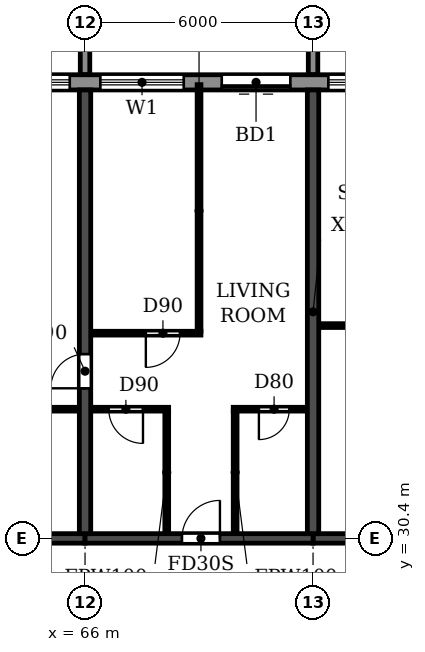
"""IFC4 building model, lengths in metres.
Left out: names, types, materials, properties, quantities, classifications, styles, units other than length and angle.
Written with IfcOpenShell. Run it as: python <this file> out.ifc"""

import sys

from ifc_helpers import new_model, si_unit, direction, frame, frame_2d, origin, place, context, subcontext, project, spatial, polyline, rectangle, outline, extrude, source, transform, mapped, element, fill, save


model = new_model("IFC4")
c1 = context("Model", 3, precision=1e-05, world=origin(), true_north=direction((0.0, 1.0)))
c2 = subcontext(c1, "Body", "Model", "MODEL_VIEW")
j1 = project(units=[si_unit("LENGTHUNIT", "METRE"), si_unit("PLANEANGLEUNIT", "RADIAN")], contexts=[c1])
p1 = place(None, origin())
s1 = spatial("IfcSite", under=j1, at=p1, CompositionType="ELEMENT")
p2 = place(p1, origin())
s2 = spatial("IfcBuilding", under=s1, at=p2, CompositionType="ELEMENT")
p3 = place(p2, frame((0.0, 0.0, 162.0)))
s3 = spatial("IfcBuildingStorey", under=s2, at=p3, CompositionType="ELEMENT", Elevation=162.0)
p4 = place(p3, frame((66.0, 30.525, 0.0), z_axis=(0.0, 0.0, 1.0), x_axis=(0.0, 1.0, 0.0)))
e1 = element("IfcWall", 1, at=p4, inside=s3, PredefinedType="SHEAR", context=c2, shape_type="SweptSolid", body=[
    extrude(rectangle(XDim=11.675, YDim=0.3, at=frame_2d((5.837, 0.0))), origin(), (0.0, 0.0, 1.0), 2.95),
])
p5 = place(p4, frame((3.825, 0.0, 0.0)))
e2 = element("IfcOpeningElement", 2, at=p5, cuts=e1, PredefinedType="OPENING", context=c2, shape_type="SweptSolid", body=[
    extrude(rectangle(XDim=0.9, YDim=2.1, at=frame_2d((0.45, 1.05))), frame((0.0, 0.16, 0.0), z_axis=(0.0, -1.0, 0.0), x_axis=(1.0, 0.0, 0.0)), (0.0, 0.0, 1.0), 0.32),
])
p6 = place(p3, frame((72.0, 30.525, 0.0), z_axis=(0.0, 0.0, 1.0), x_axis=(0.0, 1.0, 0.0)))
e3 = element("IfcWall", 3, at=p6, inside=s3, PredefinedType="SHEAR", context=c2, shape_type="SweptSolid", body=[
    extrude(rectangle(XDim=11.675, YDim=0.3, at=frame_2d((5.837, 0.0))), origin(), (0.0, 0.0, 1.0), 2.95),
])
p7 = place(p3, frame((60.0, 30.4, 0.0), z_axis=(0.0, 0.0, 1.0), x_axis=(1.0, 0.0, 0.0)))
e4 = element("IfcWall", 4, at=p7, inside=s3, PredefinedType="SHEAR", context=c2, shape_type="SweptSolid", body=[
    extrude(rectangle(XDim=6.0, YDim=0.25, at=frame_2d((3.0, 0.0))), origin(), (0.0, 0.0, 1.0), 2.35),
])
p8 = place(p3, frame((66.0, 30.4, 0.0), z_axis=(0.0, 0.0, 1.0), x_axis=(1.0, 0.0, 0.0)))
e5 = element("IfcWall", 5, at=p8, inside=s3, PredefinedType="SHEAR", context=c2, shape_type="SweptSolid", body=[
    extrude(rectangle(XDim=6.0, YDim=0.25, at=frame_2d((3.0, 0.0))), origin(), (0.0, 0.0, 1.0), 2.35),
])
p9 = place(p8, frame((2.55, 0.0, 0.0)))
e6 = element("IfcOpeningElement", 6, at=p9, cuts=e5, PredefinedType="OPENING", context=c2, shape_type="SweptSolid", body=[
    extrude(rectangle(XDim=1.0, YDim=2.1, at=frame_2d((0.5, 1.05))), frame((0.0, 0.135, 0.0), z_axis=(0.0, -1.0, 0.0), x_axis=(1.0, 0.0, 0.0)), (0.0, 0.0, 1.0), 0.27),
])
p10 = place(p3, frame((72.0, 30.4, 0.0), z_axis=(0.0, 0.0, 1.0), x_axis=(1.0, 0.0, 0.0)))
e7 = element("IfcWall", 7, at=p10, inside=s3, PredefinedType="SHEAR", context=c2, shape_type="SweptSolid", body=[
    extrude(rectangle(XDim=6.0, YDim=0.25, at=frame_2d((3.0, 0.0))), origin(), (0.0, 0.0, 1.0), 2.35),
])
p11 = place(p10, frame((2.55, 0.0, 0.0)))
e8 = element("IfcOpeningElement", 8, at=p11, cuts=e7, PredefinedType="OPENING", context=c2, shape_type="SweptSolid", body=[
    extrude(rectangle(XDim=1.0, YDim=2.1, at=frame_2d((0.5, 1.05))), frame((0.0, 0.135, 0.0), z_axis=(0.0, -1.0, 0.0), x_axis=(1.0, 0.0, 0.0)), (0.0, 0.0, 1.0), 0.27),
])
p12 = place(p3, frame((79.317, 42.4, 0.0), z_axis=(0.0, 0.0, 1.0), x_axis=(-1.0, 0.0, 0.0)))
e9 = element("IfcWall", 9, at=p12, inside=s3, PredefinedType="STANDARD", context=c2, shape_type="SweptSolid", body=[
    extrude(rectangle(XDim=56.634, YDim=0.4, at=frame_2d((28.317, 0.0))), origin(), (0.0, 0.0, 1.0), 2.95),
])
p13 = place(p12, frame((52.717, 0.0, 0.9)))
e10 = element("IfcOpeningElement", 10, at=p13, cuts=e9, PredefinedType="OPENING", context=c2, shape_type="SweptSolid", body=[
    extrude(rectangle(XDim=2.2, YDim=1.5, at=frame_2d((1.1, 0.75))), frame((0.0, 0.21, 0.0), z_axis=(0.0, -1.0, 0.0), x_axis=(1.0, 0.0, 0.0)), (0.0, 0.0, 1.0), 0.42),
])
p14 = place(p12, frame((49.917, 0.0, 0.0)))
e11 = element("IfcOpeningElement", 11, at=p14, cuts=e9, PredefinedType="OPENING", context=c2, shape_type="SweptSolid", body=[
    extrude(rectangle(XDim=1.8, YDim=2.4, at=frame_2d((0.9, 1.2))), frame((0.0, 0.21, 0.0), z_axis=(0.0, -1.0, 0.0), x_axis=(1.0, 0.0, 0.0)), (0.0, 0.0, 1.0), 0.42),
])
p15 = place(p12, frame((46.717, 0.0, 0.9)))
e12 = element("IfcOpeningElement", 12, at=p15, cuts=e9, PredefinedType="OPENING", context=c2, shape_type="SweptSolid", body=[
    extrude(rectangle(XDim=2.2, YDim=1.5, at=frame_2d((1.1, 0.75))), frame((0.0, 0.21, 0.0), z_axis=(0.0, -1.0, 0.0), x_axis=(1.0, 0.0, 0.0)), (0.0, 0.0, 1.0), 0.42),
])
p16 = place(p12, frame((43.917, 0.0, 0.0)))
e13 = element("IfcOpeningElement", 13, at=p16, cuts=e9, PredefinedType="OPENING", context=c2, shape_type="SweptSolid", body=[
    extrude(rectangle(XDim=1.8, YDim=2.4, at=frame_2d((0.9, 1.2))), frame((0.0, 0.21, 0.0), z_axis=(0.0, -1.0, 0.0), x_axis=(1.0, 0.0, 0.0)), (0.0, 0.0, 1.0), 0.42),
])
p17 = place(p12, frame((40.717, 0.0, 0.9)))
e14 = element("IfcOpeningElement", 14, at=p17, cuts=e9, PredefinedType="OPENING", context=c2, shape_type="SweptSolid", body=[
    extrude(rectangle(XDim=2.2, YDim=1.5, at=frame_2d((1.1, 0.75))), frame((0.0, 0.21, 0.0), z_axis=(0.0, -1.0, 0.0), x_axis=(1.0, 0.0, 0.0)), (0.0, 0.0, 1.0), 0.42),
])
p18 = place(p12, frame((37.917, 0.0, 0.0)))
e15 = element("IfcOpeningElement", 15, at=p18, cuts=e9, PredefinedType="OPENING", context=c2, shape_type="SweptSolid", body=[
    extrude(rectangle(XDim=1.8, YDim=2.4, at=frame_2d((0.9, 1.2))), frame((0.0, 0.21, 0.0), z_axis=(0.0, -1.0, 0.0), x_axis=(1.0, 0.0, 0.0)), (0.0, 0.0, 1.0), 0.42),
])
p19 = place(p12, frame((34.717, 0.0, 0.9)))
e16 = element("IfcOpeningElement", 16, at=p19, cuts=e9, PredefinedType="OPENING", context=c2, shape_type="SweptSolid", body=[
    extrude(rectangle(XDim=2.2, YDim=1.5, at=frame_2d((1.1, 0.75))), frame((0.0, 0.21, 0.0), z_axis=(0.0, -1.0, 0.0), x_axis=(1.0, 0.0, 0.0)), (0.0, 0.0, 1.0), 0.42),
])
p20 = place(p12, frame((31.717, 0.0, 0.9)))
e17 = element("IfcOpeningElement", 17, at=p20, cuts=e9, PredefinedType="OPENING", context=c2, shape_type="SweptSolid", body=[
    extrude(rectangle(XDim=2.2, YDim=1.5, at=frame_2d((1.1, 0.75))), frame((0.0, 0.21, 0.0), z_axis=(0.0, -1.0, 0.0), x_axis=(1.0, 0.0, 0.0)), (0.0, 0.0, 1.0), 0.42),
])
p21 = place(p12, frame((28.717, 0.0, 0.9)))
e18 = element("IfcOpeningElement", 18, at=p21, cuts=e9, PredefinedType="OPENING", context=c2, shape_type="SweptSolid", body=[
    extrude(rectangle(XDim=2.2, YDim=1.5, at=frame_2d((1.1, 0.75))), frame((0.0, 0.21, 0.0), z_axis=(0.0, -1.0, 0.0), x_axis=(1.0, 0.0, 0.0)), (0.0, 0.0, 1.0), 0.42),
])
p22 = place(p12, frame((25.717, 0.0, 0.9)))
e19 = element("IfcOpeningElement", 19, at=p22, cuts=e9, PredefinedType="OPENING", context=c2, shape_type="SweptSolid", body=[
    extrude(rectangle(XDim=2.2, YDim=1.5, at=frame_2d((1.1, 0.75))), frame((0.0, 0.21, 0.0), z_axis=(0.0, -1.0, 0.0), x_axis=(1.0, 0.0, 0.0)), (0.0, 0.0, 1.0), 0.42),
])
p23 = place(p12, frame((22.717, 0.0, 0.9)))
e20 = element("IfcOpeningElement", 20, at=p23, cuts=e9, PredefinedType="OPENING", context=c2, shape_type="SweptSolid", body=[
    extrude(rectangle(XDim=2.2, YDim=1.5, at=frame_2d((1.1, 0.75))), frame((0.0, 0.21, 0.0), z_axis=(0.0, -1.0, 0.0), x_axis=(1.0, 0.0, 0.0)), (0.0, 0.0, 1.0), 0.42),
])
p24 = place(p12, frame((19.917, 0.0, 0.0)))
e21 = element("IfcOpeningElement", 21, at=p24, cuts=e9, PredefinedType="OPENING", context=c2, shape_type="SweptSolid", body=[
    extrude(rectangle(XDim=1.8, YDim=2.4, at=frame_2d((0.9, 1.2))), frame((0.0, 0.21, 0.0), z_axis=(0.0, -1.0, 0.0), x_axis=(1.0, 0.0, 0.0)), (0.0, 0.0, 1.0), 0.42),
])
p25 = place(p12, frame((16.717, 0.0, 0.9)))
e22 = element("IfcOpeningElement", 22, at=p25, cuts=e9, PredefinedType="OPENING", context=c2, shape_type="SweptSolid", body=[
    extrude(rectangle(XDim=2.2, YDim=1.5, at=frame_2d((1.1, 0.75))), frame((0.0, 0.21, 0.0), z_axis=(0.0, -1.0, 0.0), x_axis=(1.0, 0.0, 0.0)), (0.0, 0.0, 1.0), 0.42),
])
p26 = place(p12, frame((13.717, 0.0, 0.9)))
e23 = element("IfcOpeningElement", 23, at=p26, cuts=e9, PredefinedType="OPENING", context=c2, shape_type="SweptSolid", body=[
    extrude(rectangle(XDim=2.2, YDim=1.5, at=frame_2d((1.1, 0.75))), frame((0.0, 0.21, 0.0), z_axis=(0.0, -1.0, 0.0), x_axis=(1.0, 0.0, 0.0)), (0.0, 0.0, 1.0), 0.42),
])
p27 = place(p12, frame((10.717, 0.0, 0.9)))
e24 = element("IfcOpeningElement", 24, at=p27, cuts=e9, PredefinedType="OPENING", context=c2, shape_type="SweptSolid", body=[
    extrude(rectangle(XDim=2.2, YDim=1.5, at=frame_2d((1.1, 0.75))), frame((0.0, 0.21, 0.0), z_axis=(0.0, -1.0, 0.0), x_axis=(1.0, 0.0, 0.0)), (0.0, 0.0, 1.0), 0.42),
])
p28 = place(p12, frame((7.917, 0.0, 0.0)))
e25 = element("IfcOpeningElement", 25, at=p28, cuts=e9, PredefinedType="OPENING", context=c2, shape_type="SweptSolid", body=[
    extrude(rectangle(XDim=1.8, YDim=2.4, at=frame_2d((0.9, 1.2))), frame((0.0, 0.21, 0.0), z_axis=(0.0, -1.0, 0.0), x_axis=(1.0, 0.0, 0.0)), (0.0, 0.0, 1.0), 0.42),
])
p29 = place(p12, frame((4.717, 0.0, 0.9)))
e26 = element("IfcOpeningElement", 26, at=p29, cuts=e9, PredefinedType="OPENING", context=c2, shape_type="SweptSolid", body=[
    extrude(rectangle(XDim=2.2, YDim=1.5, at=frame_2d((1.1, 0.75))), frame((0.0, 0.21, 0.0), z_axis=(0.0, -1.0, 0.0), x_axis=(1.0, 0.0, 0.0)), (0.0, 0.0, 1.0), 0.42),
])
p30 = place(p12, frame((1.917, 0.0, 0.0)))
e27 = element("IfcOpeningElement", 27, at=p30, cuts=e9, PredefinedType="OPENING", context=c2, shape_type="SweptSolid", body=[
    extrude(rectangle(XDim=1.8, YDim=2.4, at=frame_2d((0.9, 1.2))), frame((0.0, 0.21, 0.0), z_axis=(0.0, -1.0, 0.0), x_axis=(1.0, 0.0, 0.0)), (0.0, 0.0, 1.0), 0.42),
])
m1 = source(origin(), c2, "Body", "SweptSolid", [
    extrude(outline(polyline([(0.0, 0.0), (0.25, 0.0), (0.25, 3.1), (0.0, 3.1), (0.0, 0.0)])), origin(), (0.0, 0.0, 1.0), 3.1),
])
for number, where in (
    (28, (65.875, 42.6, 0.0)),
    (29, (71.875, 42.6, 0.0)),
):
    element("IfcWall", number, at=place(p3, frame(where)), inside=s3, PredefinedType="STANDARD", context=c2, shape_type="MappedRepresentation", body=[
        mapped(m1, transform((0.0, 0.0, 0.0))),
    ])
p31 = place(p3, frame((63.1, 33.8, 0.0), z_axis=(0.0, 0.0, 1.0), x_axis=(1.0, 0.0, 0.0)))
e30 = element("IfcWall", 30, at=p31, inside=s3, PredefinedType="PARTITIONING", context=c2, shape_type="SweptSolid", body=[
    extrude(rectangle(XDim=2.74, YDim=0.1, at=frame_2d((1.37, 0.0))), origin(), (0.0, 0.0, 1.0), 2.95),
])
p32 = place(p31, frame((1.0, 0.0, 0.0)))
e31 = element("IfcOpeningElement", 31, at=p32, cuts=e30, PredefinedType="OPENING", context=c2, shape_type="SweptSolid", body=[
    extrude(rectangle(XDim=0.8, YDim=2.1, at=frame_2d((0.4, 1.05))), frame((0.0, 0.06, 0.0), z_axis=(0.0, -1.0, 0.0), x_axis=(1.0, 0.0, 0.0)), (0.0, 0.0, 1.0), 0.12),
])
p33 = place(p3, frame((66.16, 33.8, 0.0), z_axis=(0.0, 0.0, 1.0), x_axis=(1.0, 0.0, 0.0)))
e32 = element("IfcWall", 32, at=p33, inside=s3, PredefinedType="PARTITIONING", context=c2, shape_type="SweptSolid", body=[
    extrude(rectangle(XDim=2.04, YDim=0.1, at=frame_2d((1.02, 0.0))), origin(), (0.0, 0.0, 1.0), 2.95),
])
p34 = place(p33, frame((0.465, 0.0, 0.0)))
e33 = element("IfcOpeningElement", 33, at=p34, cuts=e32, PredefinedType="OPENING", context=c2, shape_type="SweptSolid", body=[
    extrude(rectangle(XDim=0.9, YDim=2.1, at=frame_2d((0.45, 1.05))), frame((0.0, 0.06, 0.0), z_axis=(0.0, -1.0, 0.0), x_axis=(1.0, 0.0, 0.0)), (0.0, 0.0, 1.0), 0.12),
])
p35 = place(p3, frame((69.9, 33.8, 0.0), z_axis=(0.0, 0.0, 1.0), x_axis=(1.0, 0.0, 0.0)))
e34 = element("IfcWall", 34, at=p35, inside=s3, PredefinedType="PARTITIONING", context=c2, shape_type="SweptSolid", body=[
    extrude(rectangle(XDim=1.94, YDim=0.1, at=frame_2d((0.97, 0.0))), origin(), (0.0, 0.0, 1.0), 2.95),
])
p36 = place(p35, frame((0.675, 0.0, 0.0)))
e35 = element("IfcOpeningElement", 35, at=p36, cuts=e34, PredefinedType="OPENING", context=c2, shape_type="SweptSolid", body=[
    extrude(rectangle(XDim=0.8, YDim=2.1, at=frame_2d((0.4, 1.05))), frame((0.0, 0.06, 0.0), z_axis=(0.0, -1.0, 0.0), x_axis=(1.0, 0.0, 0.0)), (0.0, 0.0, 1.0), 0.12),
])
p37 = place(p3, frame((66.16, 35.8, 0.0), z_axis=(0.0, 0.0, 1.0), x_axis=(1.0, 0.0, 0.0)))
e36 = element("IfcWall", 36, at=p37, inside=s3, PredefinedType="PARTITIONING", context=c2, shape_type="SweptSolid", body=[
    extrude(rectangle(XDim=2.89, YDim=0.1, at=frame_2d((1.445, 0.0))), origin(), (0.0, 0.0, 1.0), 2.95),
])
p38 = place(p37, frame((1.44, 0.0, 0.0)))
e37 = element("IfcOpeningElement", 37, at=p38, cuts=e36, PredefinedType="OPENING", context=c2, shape_type="SweptSolid", body=[
    extrude(rectangle(XDim=0.9, YDim=2.1, at=frame_2d((0.45, 1.05))), frame((0.0, 0.06, 0.0), z_axis=(0.0, -1.0, 0.0), x_axis=(1.0, 0.0, 0.0)), (0.0, 0.0, 1.0), 0.12),
])
p39 = place(p3, frame((72.16, 36.0, 0.0), z_axis=(0.0, 0.0, 1.0), x_axis=(1.0, 0.0, 0.0)))
e38 = element("IfcWall", 38, at=p39, inside=s3, PredefinedType="PARTITIONING", context=c2, shape_type="SweptSolid", body=[
    extrude(rectangle(XDim=2.04, YDim=0.1, at=frame_2d((1.02, 0.0))), origin(), (0.0, 0.0, 1.0), 2.95),
])
p40 = place(p3, frame((68.15, 30.535, 0.0), z_axis=(0.0, 0.0, 1.0), x_axis=(0.0, 1.0, 0.0)))
e39 = element("IfcWall", 39, at=p40, inside=s3, PredefinedType="PARTITIONING", context=c2, shape_type="SweptSolid", body=[
    extrude(rectangle(XDim=3.215, YDim=0.1, at=frame_2d((1.607, 0.0))), origin(), (0.0, 0.0, 1.0), 2.95),
])
p41 = place(p3, frame((69.0, 35.85, 0.0), z_axis=(0.0, 0.0, 1.0), x_axis=(0.0, 1.0, 0.0)))
e40 = element("IfcWall", 40, at=p41, inside=s3, PredefinedType="PARTITIONING", context=c2, shape_type="SweptSolid", body=[
    extrude(rectangle(XDim=6.49, YDim=0.1, at=frame_2d((3.245, 0.0))), origin(), (0.0, 0.0, 1.0), 2.95),
])
p42 = place(p3, frame((69.95, 30.535, 0.0), z_axis=(0.0, 0.0, 1.0), x_axis=(0.0, 1.0, 0.0)))
e41 = element("IfcWall", 41, at=p42, inside=s3, PredefinedType="PARTITIONING", context=c2, shape_type="SweptSolid", body=[
    extrude(rectangle(XDim=3.215, YDim=0.1, at=frame_2d((1.607, 0.0))), origin(), (0.0, 0.0, 1.0), 2.95),
])
p43 = place(p26, origin())
e42 = element("IfcWindow", 42, at=p43, inside=s3, PartitioningType="DOUBLE_PANEL_HORIZONTAL", PredefinedType="WINDOW", context=c2, shape_type="SweptSolid", body=[
    extrude(rectangle(XDim=2.2, YDim=1.5, at=frame_2d((1.1, 0.75))), frame((0.0, 0.03, 0.0), z_axis=(0.0, -1.0, 0.0), x_axis=(1.0, 0.0, 0.0)), (0.0, 0.0, 1.0), 0.06),
])
fill(e23, e42)
p44 = place(p27, origin())
e43 = element("IfcWindow", 43, at=p44, inside=s3, PartitioningType="DOUBLE_PANEL_HORIZONTAL", PredefinedType="WINDOW", context=c2, shape_type="SweptSolid", body=[
    extrude(rectangle(XDim=2.2, YDim=1.5, at=frame_2d((1.1, 0.75))), frame((0.0, 0.03, 0.0), z_axis=(0.0, -1.0, 0.0), x_axis=(1.0, 0.0, 0.0)), (0.0, 0.0, 1.0), 0.06),
])
fill(e24, e43)
p45 = place(p28, origin())
e44 = element("IfcDoor", 44, at=p45, inside=s3, OperationType="DOUBLE_DOOR_SLIDING", PredefinedType="DOOR", context=c2, shape_type="SweptSolid", body=[
    extrude(rectangle(XDim=1.8, YDim=2.4, at=frame_2d((0.9, 1.2))), frame((0.0, 0.025, 0.0), z_axis=(0.0, -1.0, 0.0), x_axis=(1.0, 0.0, 0.0)), (0.0, 0.0, 1.0), 0.05),
])
fill(e25, e44)
p46 = place(p29, origin())
e45 = element("IfcWindow", 45, at=p46, inside=s3, PartitioningType="DOUBLE_PANEL_HORIZONTAL", PredefinedType="WINDOW", context=c2, shape_type="SweptSolid", body=[
    extrude(rectangle(XDim=2.2, YDim=1.5, at=frame_2d((1.1, 0.75))), frame((0.0, 0.03, 0.0), z_axis=(0.0, -1.0, 0.0), x_axis=(1.0, 0.0, 0.0)), (0.0, 0.0, 1.0), 0.06),
])
fill(e26, e45)
p47 = place(p5, origin())
e46 = element("IfcDoor", 46, at=p47, inside=s3, OperationType="SINGLE_SWING_LEFT", PredefinedType="DOOR", context=c2, shape_type="SweptSolid", body=[
    extrude(rectangle(XDim=0.9, YDim=2.1, at=frame_2d((0.45, 1.05))), frame((0.0, 0.025, 0.0), z_axis=(0.0, -1.0, 0.0), x_axis=(1.0, 0.0, 0.0)), (0.0, 0.0, 1.0), 0.05),
])
fill(e2, e46)
p48 = place(p34, frame((0.9, 0.0, 0.0), z_axis=(0.0, 0.0, 1.0), x_axis=(-1.0, 0.0, 0.0)))
e47 = element("IfcDoor", 47, at=p48, inside=s3, OperationType="SINGLE_SWING_LEFT", PredefinedType="DOOR", context=c2, shape_type="SweptSolid", body=[
    extrude(rectangle(XDim=0.9, YDim=2.1, at=frame_2d((0.45, 1.05))), frame((0.0, 0.025, 0.0), z_axis=(0.0, -1.0, 0.0), x_axis=(1.0, 0.0, 0.0)), (0.0, 0.0, 1.0), 0.05),
])
fill(e33, e47)
p49 = place(p38, frame((0.9, 0.0, 0.0), z_axis=(0.0, 0.0, 1.0), x_axis=(-1.0, 0.0, 0.0)))
e48 = element("IfcDoor", 48, at=p49, inside=s3, OperationType="SINGLE_SWING_RIGHT", PredefinedType="DOOR", context=c2, shape_type="SweptSolid", body=[
    extrude(rectangle(XDim=0.9, YDim=2.1, at=frame_2d((0.45, 1.05))), frame((0.0, 0.025, 0.0), z_axis=(0.0, -1.0, 0.0), x_axis=(1.0, 0.0, 0.0)), (0.0, 0.0, 1.0), 0.05),
])
fill(e37, e48)
p50 = place(p9, origin())
e49 = element("IfcDoor", 49, at=p50, inside=s3, OperationType="SINGLE_SWING_RIGHT", PredefinedType="DOOR", context=c2, shape_type="SweptSolid", body=[
    extrude(rectangle(XDim=1.0, YDim=2.1, at=frame_2d((0.5, 1.05))), frame((0.0, 0.025, 0.0), z_axis=(0.0, -1.0, 0.0), x_axis=(1.0, 0.0, 0.0)), (0.0, 0.0, 1.0), 0.05),
])
fill(e6, e49)
p51 = place(p36, frame((0.8, 0.0, 0.0), z_axis=(0.0, 0.0, 1.0), x_axis=(-1.0, 0.0, 0.0)))
e50 = element("IfcDoor", 50, at=p51, inside=s3, OperationType="SINGLE_SWING_RIGHT", PredefinedType="DOOR", context=c2, shape_type="SweptSolid", body=[
    extrude(rectangle(XDim=0.8, YDim=2.1, at=frame_2d((0.4, 1.05))), frame((0.0, 0.025, 0.0), z_axis=(0.0, -1.0, 0.0), x_axis=(1.0, 0.0, 0.0)), (0.0, 0.0, 1.0), 0.05),
])
fill(e35, e50)
save(model, sys.argv[1])
